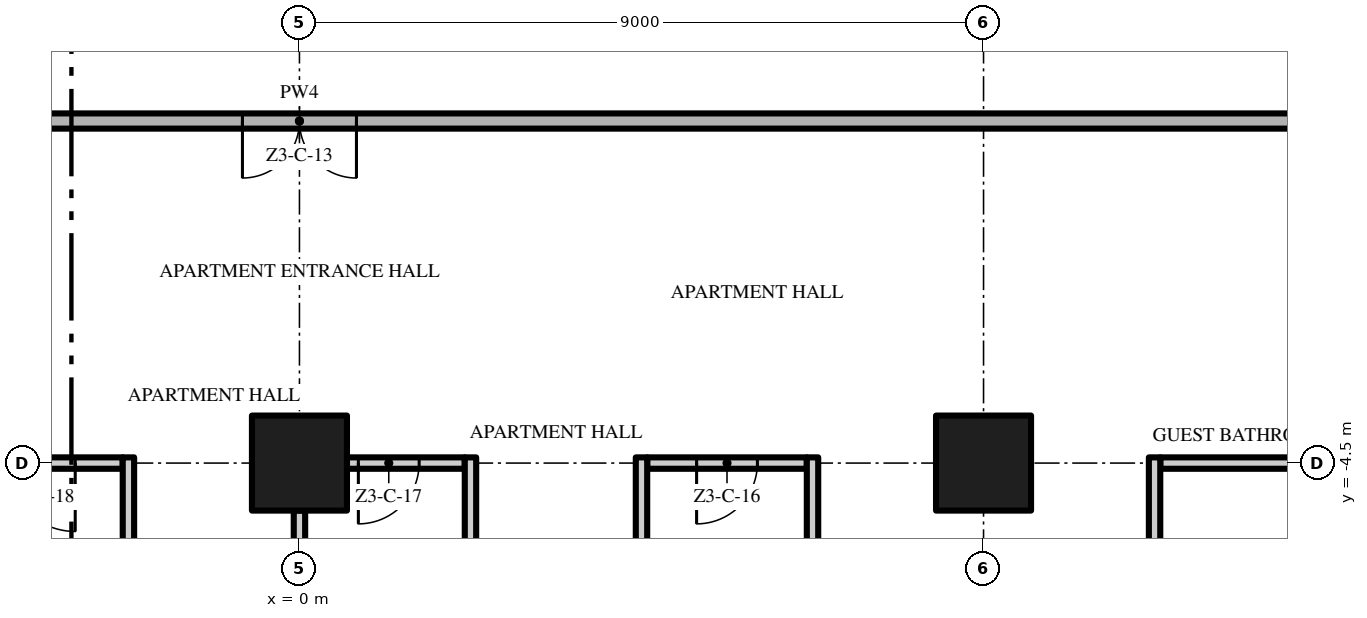
"""IFC4 building model, lengths in metres.
Left out: names, types, materials, properties, quantities, classifications, styles, units other than length and angle.
Written with IfcOpenShell. Run it as: python <this file> out.ifc"""

import sys

from ifc_helpers import new_model, si_unit, direction, frame, frame_2d, origin, origin_2d, place, context, subcontext, project, spatial, rectangle, extrude, element, fill, save


model = new_model("IFC4")
c1 = context("Model", 3, precision=1e-05, world=origin(), true_north=direction((0.0, 1.0)))
c2 = subcontext(c1, "Body", "Model", "MODEL_VIEW")
j1 = project(units=[si_unit("LENGTHUNIT", "METRE"), si_unit("PLANEANGLEUNIT", "RADIAN")], contexts=[c1])
p1 = place(None, origin())
s1 = spatial("IfcSite", under=j1, at=p1, CompositionType="ELEMENT")
p2 = place(p1, origin())
s2 = spatial("IfcBuilding", under=s1, at=p2, CompositionType="ELEMENT")
p3 = place(p2, frame((0.0, 0.0, 151.6)))
s3 = spatial("IfcBuildingStorey", under=s2, at=p3, CompositionType="ELEMENT", Elevation=151.6)
for number, where, z_axis, x_axis in (
    (1, (0.0, -4.5, 0.0), (0.0, 0.0, 1.0), (1.0, 0.0, 0.0)),
    (2, (9.0, -4.5, 0.0), (0.0, 0.0, 1.0), (1.0, 0.0, 0.0)),
):
    element("IfcColumn", number, at=place(p3, frame(where, z_axis=z_axis, x_axis=x_axis)), inside=s3, PredefinedType="COLUMN", context=c2, shape_type="SweptSolid", body=[
        extrude(rectangle(XDim=1.25, YDim=1.25, at=origin_2d()), origin(), (0.0, 0.0, 1.0), 3.5),
    ])
p4 = place(p3, frame((-2.325, -4.5, 0.0), z_axis=(0.0, 0.0, 1.0), x_axis=(-1.0, 0.0, 0.0)))
e3 = element("IfcWall", 3, at=p4, inside=s3, PredefinedType="PARTITIONING", context=c2, shape_type="SweptSolid", body=[
    extrude(rectangle(XDim=4.35, YDim=0.15, at=frame_2d((2.175, 0.0))), origin(), (0.0, 0.0, 1.0), 3.5),
])
p5 = place(p4, frame((0.625, 0.0, 0.0)))
e4 = element("IfcOpeningElement", 4, at=p5, cuts=e3, PredefinedType="OPENING", context=c2, shape_type="SweptSolid", body=[
    extrude(rectangle(XDim=0.9, YDim=2.1, at=frame_2d((0.45, 1.05))), frame((0.0, 0.085, 0.0), z_axis=(0.0, -1.0, 0.0), x_axis=(1.0, 0.0, 0.0)), (0.0, 0.0, 1.0), 0.17),
])
p6 = place(p4, frame((2.9, 0.0, 0.0)))
e5 = element("IfcOpeningElement", 5, at=p6, cuts=e3, PredefinedType="OPENING", context=c2, shape_type="SweptSolid", body=[
    extrude(rectangle(XDim=0.8, YDim=2.0, at=frame_2d((0.4, 1.0))), frame((0.0, 0.085, 0.0), z_axis=(0.0, -1.0, 0.0), x_axis=(1.0, 0.0, 0.0)), (0.0, 0.0, 1.0), 0.17),
])
p7 = place(p3, frame((2.175, -4.5, 0.0), z_axis=(0.0, 0.0, 1.0), x_axis=(-1.0, 0.0, 0.0)))
e6 = element("IfcWall", 6, at=p7, inside=s3, PredefinedType="PARTITIONING", context=c2, shape_type="SweptSolid", body=[
    extrude(rectangle(XDim=1.55, YDim=0.15, at=frame_2d((0.775, 0.0))), origin(), (0.0, 0.0, 1.0), 3.5),
])
p8 = place(p7, frame((0.6, 0.0, 0.0)))
e7 = element("IfcOpeningElement", 7, at=p8, cuts=e6, PredefinedType="OPENING", context=c2, shape_type="SweptSolid", body=[
    extrude(rectangle(XDim=0.8, YDim=2.0, at=frame_2d((0.4, 1.0))), frame((0.0, 0.085, 0.0), z_axis=(0.0, -1.0, 0.0), x_axis=(1.0, 0.0, 0.0)), (0.0, 0.0, 1.0), 0.17),
])
p9 = place(p3, frame((6.675, -4.5, 0.0), z_axis=(0.0, 0.0, 1.0), x_axis=(-1.0, 0.0, 0.0)))
e8 = element("IfcWall", 8, at=p9, inside=s3, PredefinedType="PARTITIONING", context=c2, shape_type="SweptSolid", body=[
    extrude(rectangle(XDim=2.1, YDim=0.15, at=frame_2d((1.05, 0.0))), origin(), (0.0, 0.0, 1.0), 3.5),
])
p10 = place(p9, frame((0.65, 0.0, 0.0)))
e9 = element("IfcOpeningElement", 9, at=p10, cuts=e8, PredefinedType="OPENING", context=c2, shape_type="SweptSolid", body=[
    extrude(rectangle(XDim=0.8, YDim=2.0, at=frame_2d((0.4, 1.0))), frame((0.0, 0.085, 0.0), z_axis=(0.0, -1.0, 0.0), x_axis=(1.0, 0.0, 0.0)), (0.0, 0.0, 1.0), 0.17),
])
p11 = place(p3, frame((11.325, -4.5, 0.0), z_axis=(0.0, 0.0, 1.0), x_axis=(1.0, 0.0, 0.0)))
e10 = element("IfcWall", 10, at=p11, inside=s3, PredefinedType="PARTITIONING", context=c2, shape_type="SweptSolid", body=[
    extrude(rectangle(XDim=2.1, YDim=0.15, at=frame_2d((1.05, 0.0))), origin(), (0.0, 0.0, 1.0), 3.5),
])
p12 = place(p3, frame((17.5, 0.0, 0.0), z_axis=(0.0, 0.0, 1.0), x_axis=(-1.0, 0.0, 0.0)))
e11 = element("IfcWall", 11, at=p12, inside=s3, PredefinedType="PARTITIONING", context=c2, shape_type="SweptSolid", body=[
    extrude(rectangle(XDim=35.0, YDim=0.2, at=frame_2d((17.5, 0.0))), origin(), (0.0, 0.0, 1.0), 3.5),
])
p13 = place(p12, frame((16.75, 0.0, 0.0)))
e12 = element("IfcOpeningElement", 12, at=p13, cuts=e11, PredefinedType="OPENING", context=c2, shape_type="SweptSolid", body=[
    extrude(rectangle(XDim=1.5, YDim=2.4, at=frame_2d((0.75, 1.2))), frame((0.0, 0.11, 0.0), z_axis=(0.0, -1.0, 0.0), x_axis=(1.0, 0.0, 0.0)), (0.0, 0.0, 1.0), 0.22),
])
p14 = place(p3, frame((-2.25, -12.075, 0.0), z_axis=(0.0, 0.0, 1.0), x_axis=(0.0, 1.0, 0.0)))
e13 = element("IfcWall", 13, at=p14, inside=s3, PredefinedType="PARTITIONING", context=c2, shape_type="SweptSolid", body=[
    extrude(rectangle(XDim=7.65, YDim=0.15, at=frame_2d((3.825, 0.0))), origin(), (0.0, 0.0, 1.0), 3.5),
])
p15 = place(p3, frame((0.0, -12.875, 0.0), z_axis=(0.0, 0.0, 1.0), x_axis=(0.0, 1.0, 0.0)))
e14 = element("IfcWall", 14, at=p15, inside=s3, PredefinedType="PARTITIONING", context=c2, shape_type="SweptSolid", body=[
    extrude(rectangle(XDim=7.75, YDim=0.15, at=frame_2d((3.875, 0.0))), origin(), (0.0, 0.0, 1.0), 3.5),
])
p16 = place(p3, frame((2.25, -8.925, 0.0), z_axis=(0.0, 0.0, 1.0), x_axis=(0.0, 1.0, 0.0)))
e15 = element("IfcWall", 15, at=p16, inside=s3, PredefinedType="PARTITIONING", context=c2, shape_type="SweptSolid", body=[
    extrude(rectangle(XDim=4.5, YDim=0.15, at=frame_2d((2.25, 0.0))), origin(), (0.0, 0.0, 1.0), 3.5),
])
p17 = place(p3, frame((4.5, -17.7, 0.0), z_axis=(0.0, 0.0, 1.0), x_axis=(0.0, 1.0, 0.0)))
e16 = element("IfcWall", 16, at=p17, inside=s3, PredefinedType="PARTITIONING", context=c2, shape_type="SweptSolid", body=[
    extrude(rectangle(XDim=13.275, YDim=0.15, at=frame_2d((6.638, 0.0))), origin(), (0.0, 0.0, 1.0), 3.5),
])
for number, where, z_axis, x_axis in (
    (17, (6.75, -12.075, 0.0), (0.0, 0.0, 1.0), (0.0, 1.0, 0.0)),
    (18, (11.25, -12.075, 0.0), (0.0, 0.0, 1.0), (0.0, 1.0, 0.0)),
):
    element("IfcWall", number, at=place(p3, frame(where, z_axis=z_axis, x_axis=x_axis)), inside=s3, PredefinedType="PARTITIONING", context=c2, shape_type="SweptSolid", body=[
        extrude(rectangle(XDim=7.65, YDim=0.15, at=frame_2d((3.825, 0.0))), origin(), (0.0, 0.0, 1.0), 3.5),
    ])
p18 = place(p13, origin())
e19 = element("IfcDoor", 19, at=p18, inside=s3, OperationType="DOUBLE_DOOR_SINGLE_SWING", PredefinedType="DOOR", context=c2, shape_type="SweptSolid", body=[
    extrude(rectangle(XDim=1.5, YDim=2.4, at=frame_2d((0.75, 1.2))), frame((0.0, 0.025, 0.0), z_axis=(0.0, -1.0, 0.0), x_axis=(1.0, 0.0, 0.0)), (0.0, 0.0, 1.0), 0.05),
])
fill(e12, e19)
p19 = place(p10, origin())
e20 = element("IfcDoor", 20, at=p19, inside=s3, OperationType="SINGLE_SWING_RIGHT", PredefinedType="DOOR", context=c2, shape_type="SweptSolid", body=[
    extrude(rectangle(XDim=0.8, YDim=2.0, at=frame_2d((0.4, 1.0))), frame((0.0, 0.025, 0.0), z_axis=(0.0, -1.0, 0.0), x_axis=(1.0, 0.0, 0.0)), (0.0, 0.0, 1.0), 0.05),
])
fill(e9, e20)
p20 = place(p8, origin())
e21 = element("IfcDoor", 21, at=p20, inside=s3, OperationType="SINGLE_SWING_RIGHT", PredefinedType="DOOR", context=c2, shape_type="SweptSolid", body=[
    extrude(rectangle(XDim=0.8, YDim=2.0, at=frame_2d((0.4, 1.0))), frame((0.0, 0.025, 0.0), z_axis=(0.0, -1.0, 0.0), x_axis=(1.0, 0.0, 0.0)), (0.0, 0.0, 1.0), 0.05),
])
fill(e7, e21)
p21 = place(p5, origin())
e22 = element("IfcDoor", 22, at=p21, inside=s3, OperationType="SINGLE_SWING_LEFT", PredefinedType="DOOR", context=c2, shape_type="SweptSolid", body=[
    extrude(rectangle(XDim=0.9, YDim=2.1, at=frame_2d((0.45, 1.05))), frame((0.0, 0.025, 0.0), z_axis=(0.0, -1.0, 0.0), x_axis=(1.0, 0.0, 0.0)), (0.0, 0.0, 1.0), 0.05),
])
fill(e4, e22)
save(model, sys.argv[1])
